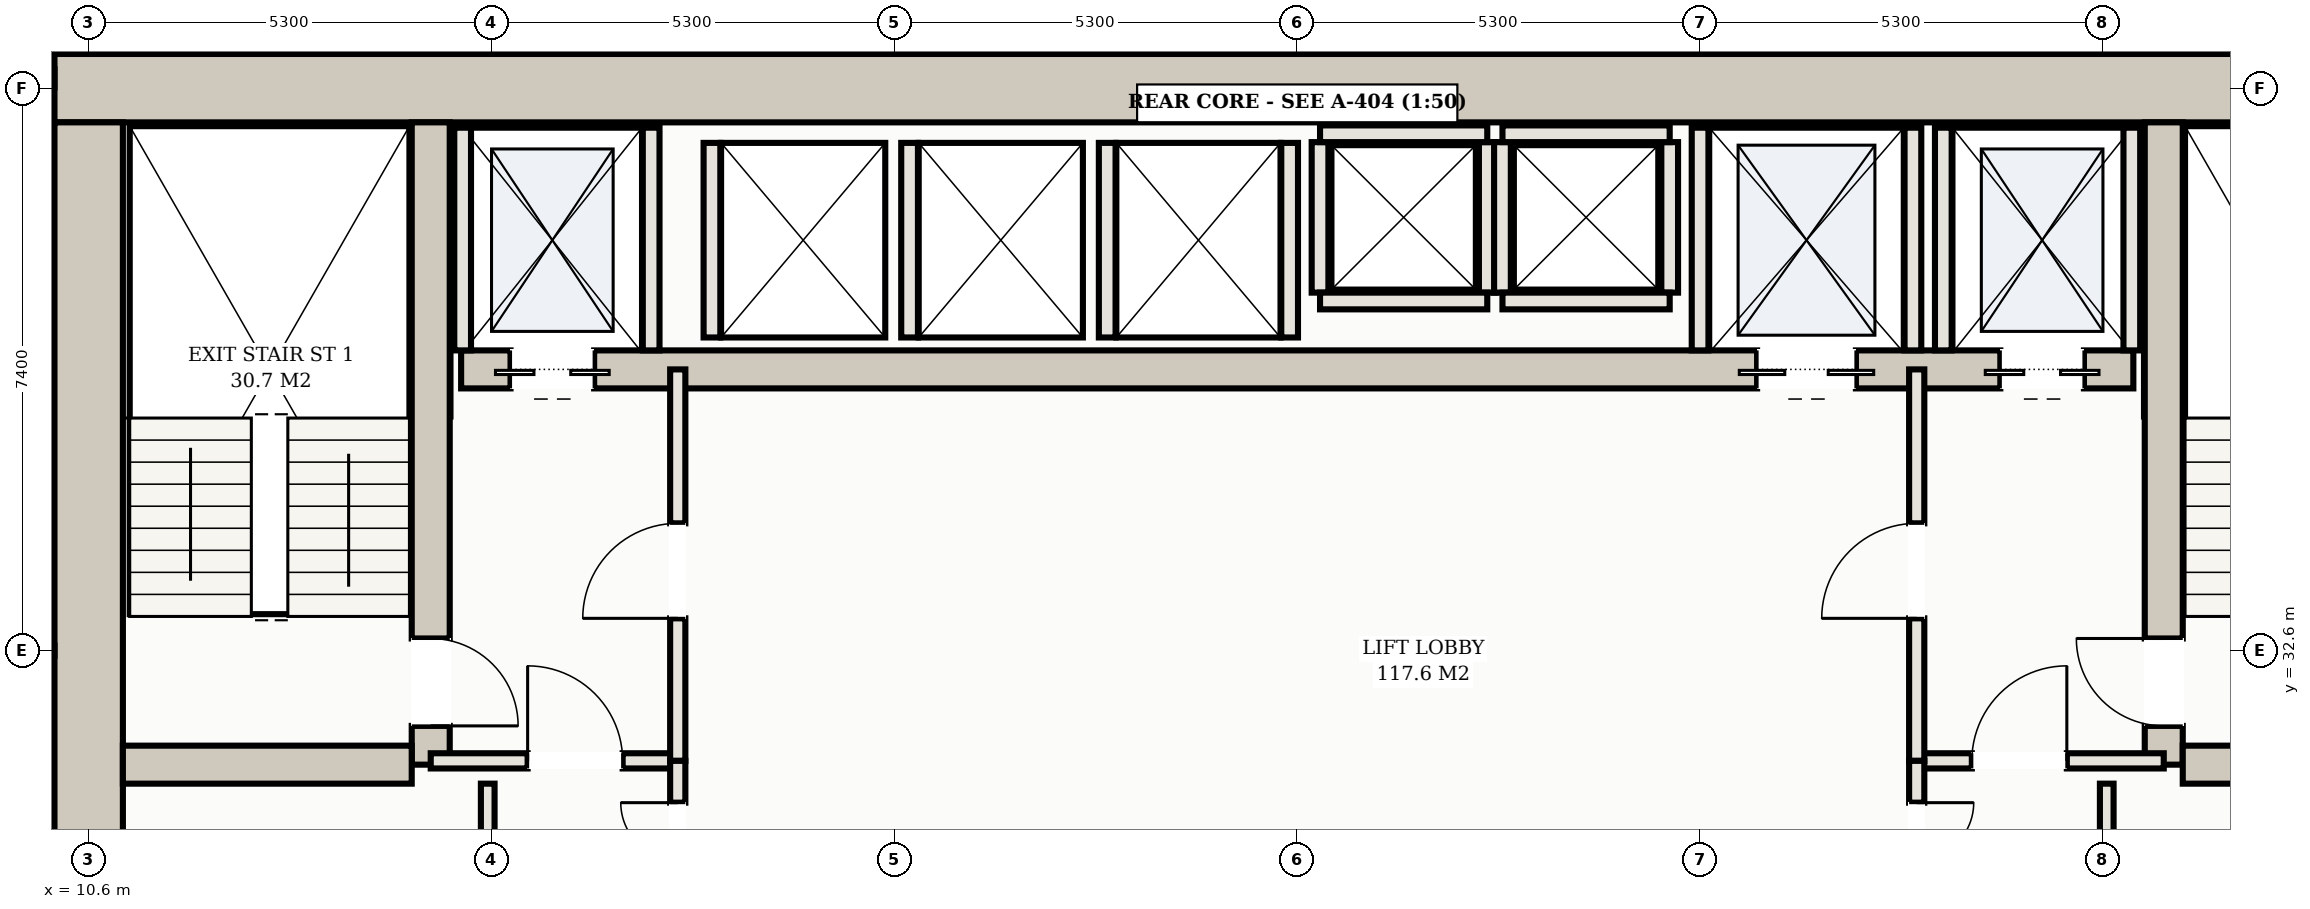
"""IFC4 building model, lengths in metres.
Left out: names, types, materials, properties, quantities, classifications, styles, units other than length and angle.
Written with IfcOpenShell. Run it as: python <this file> out.ifc"""

import sys

from ifc_helpers import new_model, si_unit, direction, frame, frame_2d, origin, place, context, subcontext, project, spatial, rectangle, extrude, element, fill, save


model = new_model("IFC4")
c1 = context("Model", 3, precision=1e-05, world=origin(), true_north=direction((0.0, 1.0)))
c2 = subcontext(c1, "Body", "Model", "MODEL_VIEW")
j1 = project(units=[si_unit("LENGTHUNIT", "METRE"), si_unit("PLANEANGLEUNIT", "RADIAN")], contexts=[c1])
p1 = place(None, origin())
s1 = spatial("IfcSite", under=j1, at=p1, CompositionType="ELEMENT")
p2 = place(p1, origin())
s2 = spatial("IfcBuilding", under=s1, at=p2, CompositionType="ELEMENT")
p3 = place(p2, frame((0.0, 0.0, 24.2)))
s3 = spatial("IfcBuildingStorey", under=s2, at=p3, CompositionType="ELEMENT", Elevation=24.2)
p4 = place(p3, frame((10.15, 40.0, 0.0), z_axis=(0.0, 0.0, 1.0), x_axis=(1.0, 0.0, 0.0)))
e1 = element("IfcWall", 1, at=p4, inside=s3, PredefinedType="SHEAR", context=c2, shape_type="SweptSolid", body=[
    extrude(rectangle(XDim=32.7, YDim=0.9, at=frame_2d((16.35, 0.0))), origin(), (0.0, 0.0, 1.0), 3.08),
])
p5 = place(p3, frame((10.6, 25.65, 0.0), z_axis=(0.0, 0.0, 1.0), x_axis=(0.0, 1.0, 0.0)))
e2 = element("IfcWall", 2, at=p5, inside=s3, PredefinedType="SHEAR", context=c2, shape_type="SweptSolid", body=[
    extrude(rectangle(XDim=13.9, YDim=0.9, at=frame_2d((6.95, 0.0))), origin(), (0.0, 0.0, 1.0), 3.08),
])
p6 = place(p3, frame((15.1, 31.1, 0.0), z_axis=(0.0, 0.0, 1.0), x_axis=(0.0, 1.0, 0.0)))
e3 = element("IfcWall", 3, at=p6, inside=s3, PredefinedType="SHEAR", context=c2, shape_type="SweptSolid", body=[
    extrude(rectangle(XDim=8.45, YDim=0.5, at=frame_2d((4.225, 0.0))), origin(), (0.0, 0.0, 1.0), 3.08),
])
p7 = place(p6, frame((0.51, 0.0, 0.0)))
e4 = element("IfcOpeningElement", 4, at=p7, cuts=e3, PredefinedType="OPENING", context=c2, shape_type="SweptSolid", body=[
    extrude(rectangle(XDim=1.15, YDim=2.2, at=frame_2d((0.575, 1.1))), frame((0.0, 0.26, 0.0), z_axis=(0.0, -1.0, 0.0), x_axis=(1.0, 0.0, 0.0)), (0.0, 0.0, 1.0), 0.52),
])
p8 = place(p3, frame((11.05, 31.1, 0.0), z_axis=(0.0, 0.0, 1.0), x_axis=(1.0, 0.0, 0.0)))
e5 = element("IfcWall", 5, at=p8, inside=s3, PredefinedType="SHEAR", context=c2, shape_type="SweptSolid", body=[
    extrude(rectangle(XDim=3.8, YDim=0.5, at=frame_2d((1.9, 0.0))), origin(), (0.0, 0.0, 1.0), 3.08),
])
p9 = place(p3, frame((37.9, 31.1, 0.0), z_axis=(0.0, 0.0, 1.0), x_axis=(0.0, 1.0, 0.0)))
e6 = element("IfcWall", 6, at=p9, inside=s3, PredefinedType="SHEAR", context=c2, shape_type="SweptSolid", body=[
    extrude(rectangle(XDim=8.45, YDim=0.5, at=frame_2d((4.225, 0.0))), origin(), (0.0, 0.0, 1.0), 3.08),
])
p10 = place(p9, frame((0.51, 0.0, 0.0)))
e7 = element("IfcOpeningElement", 7, at=p10, cuts=e6, PredefinedType="OPENING", context=c2, shape_type="SweptSolid", body=[
    extrude(rectangle(XDim=1.15, YDim=2.2, at=frame_2d((0.575, 1.1))), frame((0.0, 0.26, 0.0), z_axis=(0.0, -1.0, 0.0), x_axis=(1.0, 0.0, 0.0)), (0.0, 0.0, 1.0), 0.52),
])
p11 = place(p3, frame((38.15, 31.1, 0.0), z_axis=(0.0, 0.0, 1.0), x_axis=(1.0, 0.0, 0.0)))
e8 = element("IfcWall", 8, at=p11, inside=s3, PredefinedType="SHEAR", context=c2, shape_type="SweptSolid", body=[
    extrude(rectangle(XDim=3.8, YDim=0.5, at=frame_2d((1.9, 0.0))), origin(), (0.0, 0.0, 1.0), 3.08),
])
p12 = place(p3, frame((15.5, 36.3, 0.0), z_axis=(0.0, 0.0, 1.0), x_axis=(1.0, 0.0, 0.0)))
e9 = element("IfcWall", 9, at=p12, inside=s3, PredefinedType="SHEAR", context=c2, shape_type="SweptSolid", body=[
    extrude(rectangle(XDim=22.0, YDim=0.5, at=frame_2d((11.0, 0.0))), origin(), (0.0, 0.0, 1.0), 3.08),
])
p13 = place(p12, frame((0.65, 0.0, 0.0)))
e10 = element("IfcOpeningElement", 10, at=p13, cuts=e9, PredefinedType="OPENING", context=c2, shape_type="SweptSolid", body=[
    extrude(rectangle(XDim=1.1, YDim=2.15, at=frame_2d((0.55, 1.075))), frame((0.0, 0.26, 0.0), z_axis=(0.0, -1.0, 0.0), x_axis=(1.0, 0.0, 0.0)), (0.0, 0.0, 1.0), 0.52),
])
p14 = place(p12, frame((20.25, 0.0, 0.0)))
e11 = element("IfcOpeningElement", 11, at=p14, cuts=e9, PredefinedType="OPENING", context=c2, shape_type="SweptSolid", body=[
    extrude(rectangle(XDim=1.1, YDim=2.15, at=frame_2d((0.55, 1.075))), frame((0.0, 0.26, 0.0), z_axis=(0.0, -1.0, 0.0), x_axis=(1.0, 0.0, 0.0)), (0.0, 0.0, 1.0), 0.52),
])
p15 = place(p12, frame((17.05, 0.0, 0.0)))
e12 = element("IfcOpeningElement", 12, at=p15, cuts=e9, PredefinedType="OPENING", context=c2, shape_type="SweptSolid", body=[
    extrude(rectangle(XDim=1.3, YDim=2.2, at=frame_2d((0.65, 1.1))), frame((0.0, 0.26, 0.0), z_axis=(0.0, -1.0, 0.0), x_axis=(1.0, 0.0, 0.0)), (0.0, 0.0, 1.0), 0.52),
])
for number, where, z_axis, x_axis in (
    (13, (15.52, 36.55, 0.0), (0.0, 0.0, 1.0), (0.0, 1.0, 0.0)),
    (14, (18.0, 36.55, 0.0), (0.0, 0.0, 1.0), (0.0, 1.0, 0.0)),
    (15, (35.0, 36.55, 0.0), (0.0, 0.0, 1.0), (0.0, 1.0, 0.0)),
    (16, (37.48, 36.55, 0.0), (0.0, 0.0, 1.0), (0.0, 1.0, 0.0)),
    (17, (31.8, 36.55, 0.0), (0.0, 0.0, 1.0), (0.0, 1.0, 0.0)),
    (18, (34.6, 36.55, 0.0), (0.0, 0.0, 1.0), (0.0, 1.0, 0.0)),
):
    element("IfcWall", number, at=place(p3, frame(where, z_axis=z_axis, x_axis=x_axis)), inside=s3, PredefinedType="SOLIDWALL", context=c2, shape_type="SweptSolid", body=[
        extrude(rectangle(XDim=2.93, YDim=0.22, at=frame_2d((1.465, 0.0))), origin(), (0.0, 0.0, 1.0), 3.08),
    ])
for number, where, z_axis, x_axis in (
    (19, (18.8, 36.72, 0.0), (0.0, 0.0, 1.0), (0.0, 1.0, 0.0)),
    (20, (21.4, 36.72, 0.0), (0.0, 0.0, 1.0), (0.0, 1.0, 0.0)),
    (21, (24.0, 36.72, 0.0), (0.0, 0.0, 1.0), (0.0, 1.0, 0.0)),
    (22, (26.4, 36.72, 0.0), (0.0, 0.0, 1.0), (0.0, 1.0, 0.0)),
):
    element("IfcWall", number, at=place(p3, frame(where, z_axis=z_axis, x_axis=x_axis)), inside=s3, PredefinedType="SOLIDWALL", context=c2, shape_type="SweptSolid", body=[
        extrude(rectangle(XDim=2.56, YDim=0.22, at=frame_2d((1.28, 0.0))), origin(), (0.0, 0.0, 1.0), 3.08),
    ])
for number, where, z_axis, x_axis in (
    (23, (26.8, 37.31, 0.0), (0.0, 0.0, 1.0), (0.0, 1.0, 0.0)),
    (24, (29.0, 37.31, 0.0), (0.0, 0.0, 1.0), (0.0, 1.0, 0.0)),
):
    element("IfcWall", number, at=place(p3, frame(where, z_axis=z_axis, x_axis=x_axis)), inside=s3, PredefinedType="SOLIDWALL", context=c2, shape_type="SweptSolid", body=[
        extrude(rectangle(XDim=1.98, YDim=0.22, at=frame_2d((0.99, 0.0))), origin(), (0.0, 0.0, 1.0), 3.08),
    ])
for number, where, z_axis, x_axis in (
    (25, (26.8, 39.4, 0.0), (0.0, 0.0, 1.0), (1.0, 0.0, 0.0)),
    (26, (26.8, 37.2, 0.0), (0.0, 0.0, 1.0), (1.0, 0.0, 0.0)),
):
    element("IfcWall", number, at=place(p3, frame(where, z_axis=z_axis, x_axis=x_axis)), inside=s3, PredefinedType="SOLIDWALL", context=c2, shape_type="SweptSolid", body=[
        extrude(rectangle(XDim=2.2, YDim=0.22, at=frame_2d((1.1, 0.0))), origin(), (0.0, 0.0, 1.0), 3.08),
    ])
for number, where, z_axis, x_axis in (
    (27, (29.2, 37.31, 0.0), (0.0, 0.0, 1.0), (0.0, 1.0, 0.0)),
    (28, (31.4, 37.31, 0.0), (0.0, 0.0, 1.0), (0.0, 1.0, 0.0)),
):
    element("IfcWall", number, at=place(p3, frame(where, z_axis=z_axis, x_axis=x_axis)), inside=s3, PredefinedType="SOLIDWALL", context=c2, shape_type="SweptSolid", body=[
        extrude(rectangle(XDim=1.98, YDim=0.22, at=frame_2d((0.99, 0.0))), origin(), (0.0, 0.0, 1.0), 3.08),
    ])
for number, where, z_axis, x_axis in (
    (29, (29.2, 39.4, 0.0), (0.0, 0.0, 1.0), (1.0, 0.0, 0.0)),
    (30, (29.2, 37.2, 0.0), (0.0, 0.0, 1.0), (1.0, 0.0, 0.0)),
):
    element("IfcWall", number, at=place(p3, frame(where, z_axis=z_axis, x_axis=x_axis)), inside=s3, PredefinedType="SOLIDWALL", context=c2, shape_type="SweptSolid", body=[
        extrude(rectangle(XDim=2.2, YDim=0.22, at=frame_2d((1.1, 0.0))), origin(), (0.0, 0.0, 1.0), 3.08),
    ])
p16 = place(p3, frame((10.15, 40.13, 0.0), z_axis=(0.0, 0.0, 1.0), x_axis=(-1.0, 0.0, 0.0)))
e31 = element("IfcWall", 31, at=p16, inside=s3, PredefinedType="SOLIDWALL", context=c2, shape_type="SweptSolid", body=[
    extrude(rectangle(XDim=4.7, YDim=0.24, at=frame_2d((2.35, 0.0))), origin(), (0.0, 0.0, 1.0), 3.08),
])
p17 = place(p3, frame((15.1, 31.15, 0.0), z_axis=(0.0, 0.0, 1.0), x_axis=(1.0, 0.0, 0.0)))
e32 = element("IfcWall", 32, at=p17, inside=s3, PredefinedType="PARTITIONING", context=c2, shape_type="SweptSolid", body=[
    extrude(rectangle(XDim=3.25, YDim=0.2, at=frame_2d((1.625, 0.0))), origin(), (0.0, 0.0, 1.0), 2.57),
])
p18 = place(p17, frame((1.275, 0.0, 0.0)))
e33 = element("IfcOpeningElement", 33, at=p18, cuts=e32, PredefinedType="OPENING", context=c2, shape_type="SweptSolid", body=[
    extrude(rectangle(XDim=1.25, YDim=2.2, at=frame_2d((0.625, 1.1))), frame((0.0, 0.11, 0.0), z_axis=(0.0, -1.0, 0.0), x_axis=(1.0, 0.0, 0.0)), (0.0, 0.0, 1.0), 0.22),
])
p19 = place(p3, frame((18.35, 31.15, 0.0), z_axis=(0.0, 0.0, 1.0), x_axis=(0.0, 1.0, 0.0)))
e34 = element("IfcWall", 34, at=p19, inside=s3, PredefinedType="PARTITIONING", context=c2, shape_type="SweptSolid", body=[
    extrude(rectangle(XDim=5.15, YDim=0.2, at=frame_2d((2.575, 0.0))), origin(), (0.0, 0.0, 1.0), 2.57),
])
p20 = place(p19, frame((1.875, 0.0, 0.0)))
e35 = element("IfcOpeningElement", 35, at=p20, cuts=e34, PredefinedType="OPENING", context=c2, shape_type="SweptSolid", body=[
    extrude(rectangle(XDim=1.25, YDim=2.2, at=frame_2d((0.625, 1.1))), frame((0.0, 0.11, 0.0), z_axis=(0.0, -1.0, 0.0), x_axis=(1.0, 0.0, 0.0)), (0.0, 0.0, 1.0), 0.22),
])
p21 = place(p3, frame((34.65, 31.15, 0.0), z_axis=(0.0, 0.0, 1.0), x_axis=(1.0, 0.0, 0.0)))
e36 = element("IfcWall", 36, at=p21, inside=s3, PredefinedType="PARTITIONING", context=c2, shape_type="SweptSolid", body=[
    extrude(rectangle(XDim=3.25, YDim=0.2, at=frame_2d((1.625, 0.0))), origin(), (0.0, 0.0, 1.0), 2.57),
])
p22 = place(p21, frame((0.725, 0.0, 0.0)))
e37 = element("IfcOpeningElement", 37, at=p22, cuts=e36, PredefinedType="OPENING", context=c2, shape_type="SweptSolid", body=[
    extrude(rectangle(XDim=1.25, YDim=2.2, at=frame_2d((0.625, 1.1))), frame((0.0, 0.11, 0.0), z_axis=(0.0, -1.0, 0.0), x_axis=(1.0, 0.0, 0.0)), (0.0, 0.0, 1.0), 0.22),
])
p23 = place(p3, frame((34.65, 31.15, 0.0), z_axis=(0.0, 0.0, 1.0), x_axis=(0.0, 1.0, 0.0)))
e38 = element("IfcWall", 38, at=p23, inside=s3, PredefinedType="PARTITIONING", context=c2, shape_type="SweptSolid", body=[
    extrude(rectangle(XDim=5.15, YDim=0.2, at=frame_2d((2.575, 0.0))), origin(), (0.0, 0.0, 1.0), 2.57),
])
p24 = place(p23, frame((1.875, 0.0, 0.0)))
e39 = element("IfcOpeningElement", 39, at=p24, cuts=e38, PredefinedType="OPENING", context=c2, shape_type="SweptSolid", body=[
    extrude(rectangle(XDim=1.25, YDim=2.2, at=frame_2d((0.625, 1.1))), frame((0.0, 0.11, 0.0), z_axis=(0.0, -1.0, 0.0), x_axis=(1.0, 0.0, 0.0)), (0.0, 0.0, 1.0), 0.22),
])
p25 = place(p3, frame((15.85, 25.65, 0.0), z_axis=(0.0, 0.0, 1.0), x_axis=(0.0, 1.0, 0.0)))
e40 = element("IfcWall", 40, at=p25, inside=s3, PredefinedType="PARTITIONING", context=c2, shape_type="SweptSolid", body=[
    extrude(rectangle(XDim=5.2, YDim=0.18, at=frame_2d((2.6, 0.0))), origin(), (0.0, 0.0, 1.0), 2.57),
])
p26 = place(p25, frame((2.14, 0.0, 0.0)))
e41 = element("IfcOpeningElement", 41, at=p26, cuts=e40, PredefinedType="OPENING", context=c2, shape_type="SweptSolid", body=[
    extrude(rectangle(XDim=0.92, YDim=2.15, at=frame_2d((0.46, 1.075))), frame((0.0, 0.1, 0.0), z_axis=(0.0, -1.0, 0.0), x_axis=(1.0, 0.0, 0.0)), (0.0, 0.0, 1.0), 0.2),
])
p27 = place(p3, frame((37.15, 25.65, 0.0), z_axis=(0.0, 0.0, 1.0), x_axis=(0.0, 1.0, 0.0)))
e42 = element("IfcWall", 42, at=p27, inside=s3, PredefinedType="PARTITIONING", context=c2, shape_type="SweptSolid", body=[
    extrude(rectangle(XDim=5.2, YDim=0.18, at=frame_2d((2.6, 0.0))), origin(), (0.0, 0.0, 1.0), 2.57),
])
p28 = place(p27, frame((2.14, 0.0, 0.0)))
e43 = element("IfcOpeningElement", 43, at=p28, cuts=e42, PredefinedType="OPENING", context=c2, shape_type="SweptSolid", body=[
    extrude(rectangle(XDim=0.92, YDim=2.15, at=frame_2d((0.46, 1.075))), frame((0.0, 0.1, 0.0), z_axis=(0.0, -1.0, 0.0), x_axis=(1.0, 0.0, 0.0)), (0.0, 0.0, 1.0), 0.2),
])
p29 = place(p3, frame((18.35, 28.55, 0.0), z_axis=(0.0, 0.0, 1.0), x_axis=(0.0, 1.0, 0.0)))
e44 = element("IfcWall", 44, at=p29, inside=s3, PredefinedType="PARTITIONING", context=c2, shape_type="SweptSolid", body=[
    extrude(rectangle(XDim=2.6, YDim=0.2, at=frame_2d((1.3, 0.0))), origin(), (0.0, 0.0, 1.0), 2.57),
])
p30 = place(p29, frame((0.55, 0.0, 0.0)))
e45 = element("IfcOpeningElement", 45, at=p30, cuts=e44, PredefinedType="OPENING", context=c2, shape_type="SweptSolid", body=[
    extrude(rectangle(XDim=1.5, YDim=2.25, at=frame_2d((0.75, 1.125))), frame((0.0, 0.11, 0.0), z_axis=(0.0, -1.0, 0.0), x_axis=(1.0, 0.0, 0.0)), (0.0, 0.0, 1.0), 0.22),
])
p31 = place(p3, frame((34.65, 28.55, 0.0), z_axis=(0.0, 0.0, 1.0), x_axis=(0.0, 1.0, 0.0)))
e46 = element("IfcWall", 46, at=p31, inside=s3, PredefinedType="PARTITIONING", context=c2, shape_type="SweptSolid", body=[
    extrude(rectangle(XDim=2.6, YDim=0.2, at=frame_2d((1.3, 0.0))), origin(), (0.0, 0.0, 1.0), 2.57),
])
p32 = place(p31, frame((0.55, 0.0, 0.0)))
e47 = element("IfcOpeningElement", 47, at=p32, cuts=e46, PredefinedType="OPENING", context=c2, shape_type="SweptSolid", body=[
    extrude(rectangle(XDim=1.5, YDim=2.25, at=frame_2d((0.75, 1.125))), frame((0.0, 0.11, 0.0), z_axis=(0.0, -1.0, 0.0), x_axis=(1.0, 0.0, 0.0)), (0.0, 0.0, 1.0), 0.22),
])
p33 = place(p3, frame((0.12, 32.6, 0.0), z_axis=(0.0, 0.0, 1.0), x_axis=(1.0, 0.0, 0.0)))
e48 = element("IfcWall", 48, at=p33, inside=s3, PredefinedType="PARTITIONING", context=c2, shape_type="SweptSolid", body=[
    extrude(rectangle(XDim=10.03, YDim=0.135, at=frame_2d((5.015, 0.0))), origin(), (0.0, 0.0, 1.0), 2.275),
])
p34 = place(p33, frame((6.255, 0.0, 0.0)))
e49 = element("IfcOpeningElement", 49, at=p34, cuts=e48, PredefinedType="OPENING", context=c2, shape_type="SweptSolid", body=[
    extrude(rectangle(XDim=0.92, YDim=2.15, at=frame_2d((0.46, 1.075))), frame((0.0, 0.078, 0.0), z_axis=(0.0, -1.0, 0.0), x_axis=(1.0, 0.0, 0.0)), (0.0, 0.0, 1.0), 0.155),
])
p35 = place(p13, frame((1.1, 0.0, 0.0), z_axis=(0.0, 0.0, 1.0), x_axis=(-1.0, 0.0, 0.0)))
e50 = element("IfcDoor", 50, at=p35, inside=s3, OperationType="DOUBLE_DOOR_SLIDING", PredefinedType="DOOR", context=c2, shape_type="SweptSolid", body=[
    extrude(rectangle(XDim=1.1, YDim=2.15, at=frame_2d((0.55, 1.075))), frame((0.0, 0.025, 0.0), z_axis=(0.0, -1.0, 0.0), x_axis=(1.0, 0.0, 0.0)), (0.0, 0.0, 1.0), 0.05),
])
fill(e10, e50)
p36 = place(p14, frame((1.1, 0.0, 0.0), z_axis=(0.0, 0.0, 1.0), x_axis=(-1.0, 0.0, 0.0)))
e51 = element("IfcDoor", 51, at=p36, inside=s3, OperationType="DOUBLE_DOOR_SLIDING", PredefinedType="DOOR", context=c2, shape_type="SweptSolid", body=[
    extrude(rectangle(XDim=1.1, YDim=2.15, at=frame_2d((0.55, 1.075))), frame((0.0, 0.025, 0.0), z_axis=(0.0, -1.0, 0.0), x_axis=(1.0, 0.0, 0.0)), (0.0, 0.0, 1.0), 0.05),
])
fill(e11, e51)
p37 = place(p15, frame((1.3, 0.0, 0.0), z_axis=(0.0, 0.0, 1.0), x_axis=(-1.0, 0.0, 0.0)))
e52 = element("IfcDoor", 52, at=p37, inside=s3, OperationType="DOUBLE_DOOR_SLIDING", PredefinedType="DOOR", context=c2, shape_type="SweptSolid", body=[
    extrude(rectangle(XDim=1.3, YDim=2.2, at=frame_2d((0.65, 1.1))), frame((0.0, 0.025, 0.0), z_axis=(0.0, -1.0, 0.0), x_axis=(1.0, 0.0, 0.0)), (0.0, 0.0, 1.0), 0.05),
])
fill(e12, e52)
p38 = place(p18, origin())
e53 = element("IfcDoor", 53, at=p38, inside=s3, OperationType="SINGLE_SWING_LEFT", PredefinedType="DOOR", context=c2, shape_type="SweptSolid", body=[
    extrude(rectangle(XDim=1.25, YDim=2.2, at=frame_2d((0.625, 1.1))), frame((0.0, 0.025, 0.0), z_axis=(0.0, -1.0, 0.0), x_axis=(1.0, 0.0, 0.0)), (0.0, 0.0, 1.0), 0.05),
])
fill(e33, e53)
p39 = place(p20, origin())
e54 = element("IfcDoor", 54, at=p39, inside=s3, OperationType="SINGLE_SWING_LEFT", PredefinedType="DOOR", context=c2, shape_type="SweptSolid", body=[
    extrude(rectangle(XDim=1.25, YDim=2.2, at=frame_2d((0.625, 1.1))), frame((0.0, 0.025, 0.0), z_axis=(0.0, -1.0, 0.0), x_axis=(1.0, 0.0, 0.0)), (0.0, 0.0, 1.0), 0.05),
])
fill(e35, e54)
p40 = place(p22, origin())
e55 = element("IfcDoor", 55, at=p40, inside=s3, OperationType="SINGLE_SWING_RIGHT", PredefinedType="DOOR", context=c2, shape_type="SweptSolid", body=[
    extrude(rectangle(XDim=1.25, YDim=2.2, at=frame_2d((0.625, 1.1))), frame((0.0, 0.025, 0.0), z_axis=(0.0, -1.0, 0.0), x_axis=(1.0, 0.0, 0.0)), (0.0, 0.0, 1.0), 0.05),
])
fill(e37, e55)
p41 = place(p24, origin())
e56 = element("IfcDoor", 56, at=p41, inside=s3, OperationType="SINGLE_SWING_LEFT", PredefinedType="DOOR", context=c2, shape_type="SweptSolid", body=[
    extrude(rectangle(XDim=1.25, YDim=2.2, at=frame_2d((0.625, 1.1))), frame((0.0, 0.025, 0.0), z_axis=(0.0, -1.0, 0.0), x_axis=(1.0, 0.0, 0.0)), (0.0, 0.0, 1.0), 0.05),
])
fill(e39, e56)
p42 = place(p7, frame((1.15, 0.0, 0.0), z_axis=(0.0, 0.0, 1.0), x_axis=(-1.0, 0.0, 0.0)))
e57 = element("IfcDoor", 57, at=p42, inside=s3, OperationType="SINGLE_SWING_RIGHT", PredefinedType="DOOR", context=c2, shape_type="SweptSolid", body=[
    extrude(rectangle(XDim=1.15, YDim=2.2, at=frame_2d((0.575, 1.1))), frame((0.0, 0.025, 0.0), z_axis=(0.0, -1.0, 0.0), x_axis=(1.0, 0.0, 0.0)), (0.0, 0.0, 1.0), 0.05),
])
fill(e4, e57)
p43 = place(p10, origin())
e58 = element("IfcDoor", 58, at=p43, inside=s3, OperationType="SINGLE_SWING_RIGHT", PredefinedType="DOOR", context=c2, shape_type="SweptSolid", body=[
    extrude(rectangle(XDim=1.15, YDim=2.2, at=frame_2d((0.575, 1.1))), frame((0.0, 0.025, 0.0), z_axis=(0.0, -1.0, 0.0), x_axis=(1.0, 0.0, 0.0)), (0.0, 0.0, 1.0), 0.05),
])
fill(e7, e58)
p44 = place(p30, origin())
e59 = element("IfcDoor", 59, at=p44, inside=s3, OperationType="DOUBLE_DOOR_SINGLE_SWING", PredefinedType="DOOR", context=c2, shape_type="SweptSolid", body=[
    extrude(rectangle(XDim=1.5, YDim=2.25, at=frame_2d((0.75, 1.125))), frame((0.0, 0.025, 0.0), z_axis=(0.0, -1.0, 0.0), x_axis=(1.0, 0.0, 0.0)), (0.0, 0.0, 1.0), 0.05),
])
fill(e45, e59)
p45 = place(p32, frame((1.5, 0.0, 0.0), z_axis=(0.0, 0.0, 1.0), x_axis=(-1.0, 0.0, 0.0)))
e60 = element("IfcDoor", 60, at=p45, inside=s3, OperationType="DOUBLE_DOOR_SINGLE_SWING", PredefinedType="DOOR", context=c2, shape_type="SweptSolid", body=[
    extrude(rectangle(XDim=1.5, YDim=2.25, at=frame_2d((0.75, 1.125))), frame((0.0, 0.025, 0.0), z_axis=(0.0, -1.0, 0.0), x_axis=(1.0, 0.0, 0.0)), (0.0, 0.0, 1.0), 0.05),
])
fill(e47, e60)
save(model, sys.argv[1])
